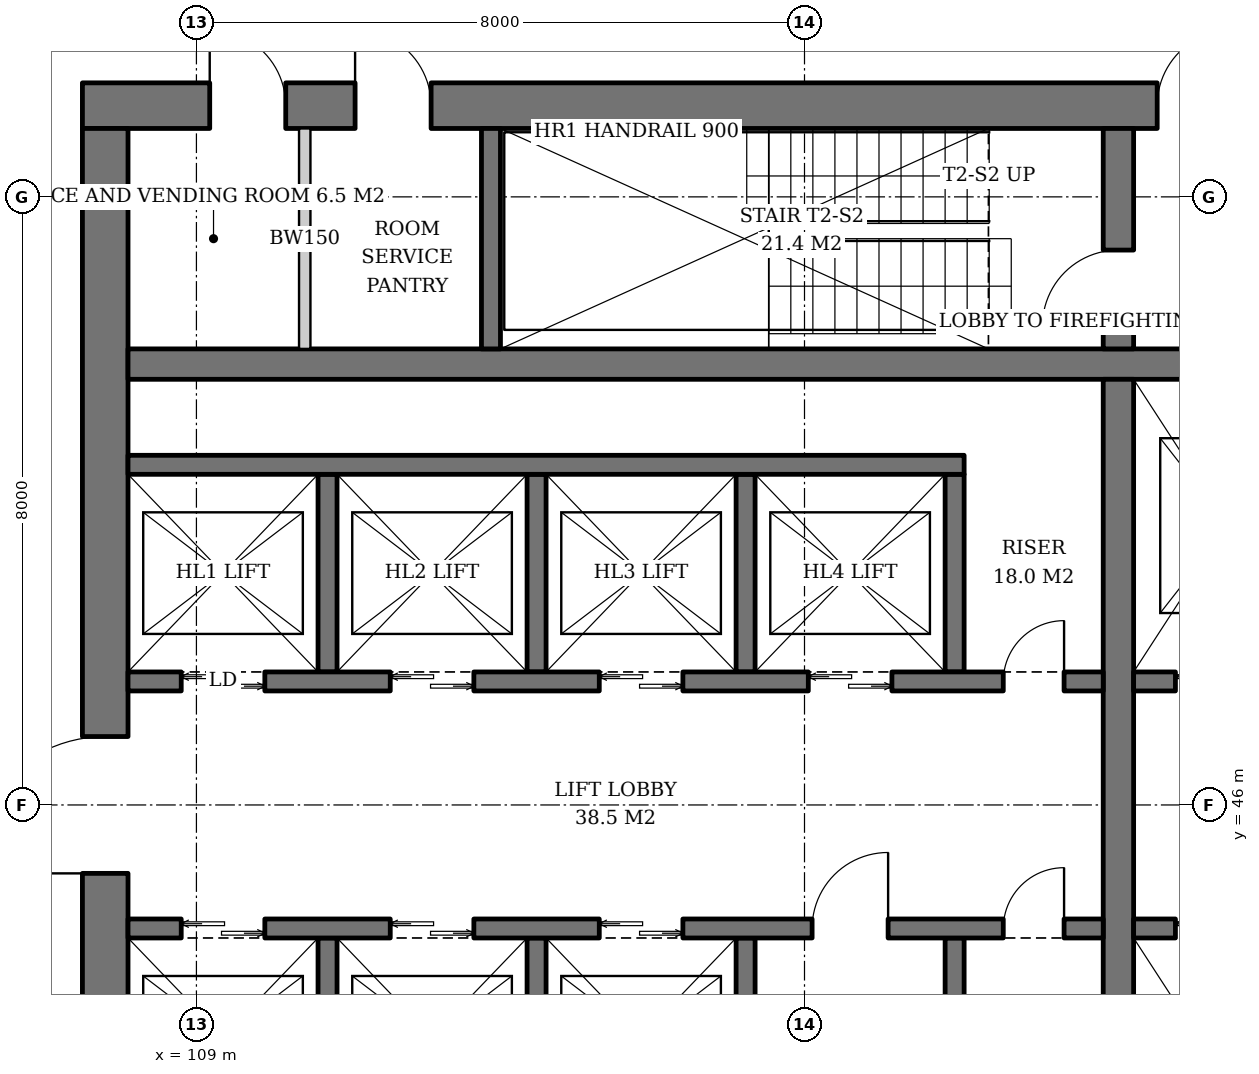
"""IFC4 building model, lengths in metres.
Left out: names, types, materials, properties, quantities, classifications, styles, units other than length and angle.
Written with IfcOpenShell. Run it as: python <this file> out.ifc"""

import sys

from ifc_helpers import new_model, si_unit, direction, frame, frame_2d, origin, place, context, subcontext, project, spatial, rectangle, extrude, element, fill, save


model = new_model("IFC4")
c1 = context("Model", 3, precision=1e-05, world=origin(), true_north=direction((0.0, 1.0)))
c2 = subcontext(c1, "Body", "Model", "MODEL_VIEW")
j1 = project(units=[si_unit("LENGTHUNIT", "METRE"), si_unit("PLANEANGLEUNIT", "RADIAN")], contexts=[c1])
p1 = place(None, origin())
s1 = spatial("IfcSite", under=j1, at=p1, CompositionType="ELEMENT")
p2 = place(p1, origin())
s2 = spatial("IfcBuilding", under=s1, at=p2, CompositionType="ELEMENT")
p3 = place(p2, frame((0.0, 0.0, 55.2)))
s3 = spatial("IfcBuildingStorey", under=s2, at=p3, CompositionType="ELEMENT", Elevation=55.2)
p4 = place(p3, frame((107.5, 55.2, 0.0), z_axis=(0.0, 0.0, 1.0), x_axis=(1.0, 0.0, 0.0)))
e1 = element("IfcWall", 1, at=p4, inside=s3, PredefinedType="SHEAR", context=c2, shape_type="SweptSolid", body=[
    extrude(rectangle(XDim=19.0, YDim=0.6, at=frame_2d((9.5, 0.0))), origin(), (0.0, 0.0, 1.0), 3.8),
])
p5 = place(p4, frame((14.14, 0.0, 0.0)))
e2 = element("IfcOpeningElement", 2, at=p5, cuts=e1, PredefinedType="OPENING", context=c2, shape_type="SweptSolid", body=[
    extrude(rectangle(XDim=1.0, YDim=2.1, at=frame_2d((0.5, 1.05))), frame((0.0, 0.31, 0.0), z_axis=(0.0, -1.0, 0.0), x_axis=(1.0, 0.0, 0.0)), (0.0, 0.0, 1.0), 0.62),
])
p6 = place(p4, frame((1.675, 0.0, 0.0)))
e3 = element("IfcOpeningElement", 3, at=p6, cuts=e1, PredefinedType="OPENING", context=c2, shape_type="SweptSolid", body=[
    extrude(rectangle(XDim=1.0, YDim=2.1, at=frame_2d((0.5, 1.05))), frame((0.0, 0.31, 0.0), z_axis=(0.0, -1.0, 0.0), x_axis=(1.0, 0.0, 0.0)), (0.0, 0.0, 1.0), 0.62),
])
p7 = place(p4, frame((3.587, 0.0, 0.0)))
e4 = element("IfcOpeningElement", 4, at=p7, cuts=e1, PredefinedType="OPENING", context=c2, shape_type="SweptSolid", body=[
    extrude(rectangle(XDim=1.0, YDim=2.1, at=frame_2d((0.5, 1.05))), frame((0.0, 0.31, 0.0), z_axis=(0.0, -1.0, 0.0), x_axis=(1.0, 0.0, 0.0)), (0.0, 0.0, 1.0), 0.62),
])
p8 = place(p3, frame((107.8, 37.1, 0.0), z_axis=(0.0, 0.0, 1.0), x_axis=(0.0, 1.0, 0.0)))
e5 = element("IfcWall", 5, at=p8, inside=s3, PredefinedType="SHEAR", context=c2, shape_type="SweptSolid", body=[
    extrude(rectangle(XDim=17.8, YDim=0.6, at=frame_2d((8.9, 0.0))), origin(), (0.0, 0.0, 1.0), 3.8),
])
p9 = place(p8, frame((8.0, 0.0, 0.0)))
e6 = element("IfcOpeningElement", 6, at=p9, cuts=e5, PredefinedType="OPENING", context=c2, shape_type="SweptSolid", body=[
    extrude(rectangle(XDim=1.8, YDim=2.4, at=frame_2d((0.9, 1.2))), frame((0.0, 0.31, 0.0), z_axis=(0.0, -1.0, 0.0), x_axis=(1.0, 0.0, 0.0)), (0.0, 0.0, 1.0), 0.62),
])
p10 = place(p3, frame((108.1, 51.8, 0.0), z_axis=(0.0, 0.0, 1.0), x_axis=(1.0, 0.0, 0.0)))
e7 = element("IfcWall", 7, at=p10, inside=s3, PredefinedType="SHEAR", context=c2, shape_type="SweptSolid", body=[
    extrude(rectangle(XDim=17.8, YDim=0.4, at=frame_2d((8.9, 0.0))), origin(), (0.0, 0.0, 1.0), 3.8),
])
p11 = place(p3, frame((121.13, 40.4, 0.0), z_axis=(0.0, 0.0, 1.0), x_axis=(0.0, 1.0, 0.0)))
e8 = element("IfcWall", 8, at=p11, inside=s3, PredefinedType="SHEAR", context=c2, shape_type="SweptSolid", body=[
    extrude(rectangle(XDim=11.2, YDim=0.4, at=frame_2d((5.6, 0.0))), origin(), (0.0, 0.0, 1.0), 3.8),
])
p12 = place(p3, frame((121.13, 52.0, 0.0), z_axis=(0.0, 0.0, 1.0), x_axis=(0.0, 1.0, 0.0)))
e9 = element("IfcWall", 9, at=p12, inside=s3, PredefinedType="SHEAR", context=c2, shape_type="SweptSolid", body=[
    extrude(rectangle(XDim=2.9, YDim=0.4, at=frame_2d((1.45, 0.0))), origin(), (0.0, 0.0, 1.0), 3.8),
])
p13 = place(p12, frame((0.3, 0.0, 0.0)))
e10 = element("IfcOpeningElement", 10, at=p13, cuts=e9, PredefinedType="OPENING", context=c2, shape_type="SweptSolid", body=[
    extrude(rectangle(XDim=1.0, YDim=2.1, at=frame_2d((0.5, 1.05))), frame((0.0, 0.21, 0.0), z_axis=(0.0, -1.0, 0.0), x_axis=(1.0, 0.0, 0.0)), (0.0, 0.0, 1.0), 0.42),
])
p14 = place(p3, frame((112.875, 52.0, 0.0), z_axis=(0.0, 0.0, 1.0), x_axis=(0.0, 1.0, 0.0)))
e11 = element("IfcWall", 11, at=p14, inside=s3, PredefinedType="SHEAR", context=c2, shape_type="SweptSolid", body=[
    extrude(rectangle(XDim=2.9, YDim=0.25, at=frame_2d((1.45, 0.0))), origin(), (0.0, 0.0, 1.0), 3.8),
])
for number, where, z_axis, x_axis in (
    (12, (110.725, 47.75, 0.0), (0.0, 0.0, 1.0), (0.0, 1.0, 0.0)),
    (13, (113.475, 47.75, 0.0), (0.0, 0.0, 1.0), (0.0, 1.0, 0.0)),
    (14, (116.225, 47.75, 0.0), (0.0, 0.0, 1.0), (0.0, 1.0, 0.0)),
    (15, (118.975, 47.75, 0.0), (0.0, 0.0, 1.0), (0.0, 1.0, 0.0)),
):
    element("IfcWall", number, at=place(p3, frame(where, z_axis=z_axis, x_axis=x_axis)), inside=s3, PredefinedType="SHEAR", context=c2, shape_type="SweptSolid", body=[
        extrude(rectangle(XDim=2.6, YDim=0.25, at=frame_2d((1.3, 0.0))), origin(), (0.0, 0.0, 1.0), 3.8),
    ])
p15 = place(p3, frame((108.1, 50.475, 0.0), z_axis=(0.0, 0.0, 1.0), x_axis=(1.0, 0.0, 0.0)))
e16 = element("IfcWall", 16, at=p15, inside=s3, PredefinedType="SHEAR", context=c2, shape_type="SweptSolid", body=[
    extrude(rectangle(XDim=11.0, YDim=0.25, at=frame_2d((5.5, 0.0))), origin(), (0.0, 0.0, 1.0), 3.8),
])
p16 = place(p3, frame((108.1, 47.625, 0.0), z_axis=(0.0, 0.0, 1.0), x_axis=(1.0, 0.0, 0.0)))
e17 = element("IfcWall", 17, at=p16, inside=s3, PredefinedType="SHEAR", context=c2, shape_type="SweptSolid", body=[
    extrude(rectangle(XDim=12.83, YDim=0.25, at=frame_2d((6.415, 0.0))), origin(), (0.0, 0.0, 1.0), 3.8),
])
p17 = place(p16, frame((0.7, 0.0, 0.0)))
e18 = element("IfcOpeningElement", 18, at=p17, cuts=e17, PredefinedType="OPENING", context=c2, shape_type="SweptSolid", body=[
    extrude(rectangle(XDim=1.1, YDim=2.2, at=frame_2d((0.55, 1.1))), frame((0.0, 0.135, 0.0), z_axis=(0.0, -1.0, 0.0), x_axis=(1.0, 0.0, 0.0)), (0.0, 0.0, 1.0), 0.27),
])
p18 = place(p16, frame((3.45, 0.0, 0.0)))
e19 = element("IfcOpeningElement", 19, at=p18, cuts=e17, PredefinedType="OPENING", context=c2, shape_type="SweptSolid", body=[
    extrude(rectangle(XDim=1.1, YDim=2.2, at=frame_2d((0.55, 1.1))), frame((0.0, 0.135, 0.0), z_axis=(0.0, -1.0, 0.0), x_axis=(1.0, 0.0, 0.0)), (0.0, 0.0, 1.0), 0.27),
])
p19 = place(p16, frame((6.2, 0.0, 0.0)))
e20 = element("IfcOpeningElement", 20, at=p19, cuts=e17, PredefinedType="OPENING", context=c2, shape_type="SweptSolid", body=[
    extrude(rectangle(XDim=1.1, YDim=2.2, at=frame_2d((0.55, 1.1))), frame((0.0, 0.135, 0.0), z_axis=(0.0, -1.0, 0.0), x_axis=(1.0, 0.0, 0.0)), (0.0, 0.0, 1.0), 0.27),
])
p20 = place(p16, frame((8.95, 0.0, 0.0)))
e21 = element("IfcOpeningElement", 21, at=p20, cuts=e17, PredefinedType="OPENING", context=c2, shape_type="SweptSolid", body=[
    extrude(rectangle(XDim=1.1, YDim=2.2, at=frame_2d((0.55, 1.1))), frame((0.0, 0.135, 0.0), z_axis=(0.0, -1.0, 0.0), x_axis=(1.0, 0.0, 0.0)), (0.0, 0.0, 1.0), 0.27),
])
p21 = place(p16, frame((11.515, 0.0, 0.0)))
e22 = element("IfcOpeningElement", 22, at=p21, cuts=e17, PredefinedType="OPENING", context=c2, shape_type="SweptSolid", body=[
    extrude(rectangle(XDim=0.8, YDim=2.0, at=frame_2d((0.4, 1.0))), frame((0.0, 0.135, 0.0), z_axis=(0.0, -1.0, 0.0), x_axis=(1.0, 0.0, 0.0)), (0.0, 0.0, 1.0), 0.27),
])
for number, where, z_axis, x_axis in (
    (23, (110.725, 44.25, 0.0), (0.0, 0.0, 1.0), (0.0, -1.0, 0.0)),
    (24, (113.475, 44.25, 0.0), (0.0, 0.0, 1.0), (0.0, -1.0, 0.0)),
    (25, (116.225, 44.25, 0.0), (0.0, 0.0, 1.0), (0.0, -1.0, 0.0)),
    (26, (118.975, 44.25, 0.0), (0.0, 0.0, 1.0), (0.0, -1.0, 0.0)),
):
    element("IfcWall", number, at=place(p3, frame(where, z_axis=z_axis, x_axis=x_axis)), inside=s3, PredefinedType="SHEAR", context=c2, shape_type="SweptSolid", body=[
        extrude(rectangle(XDim=2.6, YDim=0.25, at=frame_2d((1.3, 0.0))), origin(), (0.0, 0.0, 1.0), 3.8),
    ])
p22 = place(p3, frame((108.1, 44.375, 0.0), z_axis=(0.0, 0.0, 1.0), x_axis=(1.0, 0.0, 0.0)))
e27 = element("IfcWall", 27, at=p22, inside=s3, PredefinedType="SHEAR", context=c2, shape_type="SweptSolid", body=[
    extrude(rectangle(XDim=12.83, YDim=0.25, at=frame_2d((6.415, 0.0))), origin(), (0.0, 0.0, 1.0), 3.8),
])
p23 = place(p22, frame((0.7, 0.0, 0.0)))
e28 = element("IfcOpeningElement", 28, at=p23, cuts=e27, PredefinedType="OPENING", context=c2, shape_type="SweptSolid", body=[
    extrude(rectangle(XDim=1.1, YDim=2.2, at=frame_2d((0.55, 1.1))), frame((0.0, 0.135, 0.0), z_axis=(0.0, -1.0, 0.0), x_axis=(1.0, 0.0, 0.0)), (0.0, 0.0, 1.0), 0.27),
])
p24 = place(p22, frame((3.45, 0.0, 0.0)))
e29 = element("IfcOpeningElement", 29, at=p24, cuts=e27, PredefinedType="OPENING", context=c2, shape_type="SweptSolid", body=[
    extrude(rectangle(XDim=1.1, YDim=2.2, at=frame_2d((0.55, 1.1))), frame((0.0, 0.135, 0.0), z_axis=(0.0, -1.0, 0.0), x_axis=(1.0, 0.0, 0.0)), (0.0, 0.0, 1.0), 0.27),
])
p25 = place(p22, frame((6.2, 0.0, 0.0)))
e30 = element("IfcOpeningElement", 30, at=p25, cuts=e27, PredefinedType="OPENING", context=c2, shape_type="SweptSolid", body=[
    extrude(rectangle(XDim=1.1, YDim=2.2, at=frame_2d((0.55, 1.1))), frame((0.0, 0.135, 0.0), z_axis=(0.0, -1.0, 0.0), x_axis=(1.0, 0.0, 0.0)), (0.0, 0.0, 1.0), 0.27),
])
p26 = place(p22, frame((9.0, 0.0, 0.0)))
e31 = element("IfcOpeningElement", 31, at=p26, cuts=e27, PredefinedType="OPENING", context=c2, shape_type="SweptSolid", body=[
    extrude(rectangle(XDim=1.0, YDim=2.1, at=frame_2d((0.5, 1.05))), frame((0.0, 0.135, 0.0), z_axis=(0.0, -1.0, 0.0), x_axis=(1.0, 0.0, 0.0)), (0.0, 0.0, 1.0), 0.27),
])
p27 = place(p22, frame((11.515, 0.0, 0.0)))
e32 = element("IfcOpeningElement", 32, at=p27, cuts=e27, PredefinedType="OPENING", context=c2, shape_type="SweptSolid", body=[
    extrude(rectangle(XDim=0.8, YDim=2.0, at=frame_2d((0.4, 1.0))), frame((0.0, 0.135, 0.0), z_axis=(0.0, -1.0, 0.0), x_axis=(1.0, 0.0, 0.0)), (0.0, 0.0, 1.0), 0.27),
])
p28 = place(p3, frame((121.33, 47.625, 0.0), z_axis=(0.0, 0.0, 1.0), x_axis=(1.0, 0.0, 0.0)))
e33 = element("IfcWall", 33, at=p28, inside=s3, PredefinedType="SHEAR", context=c2, shape_type="SweptSolid", body=[
    extrude(rectangle(XDim=4.57, YDim=0.25, at=frame_2d((2.285, 0.0))), origin(), (0.0, 0.0, 1.0), 3.8),
])
p29 = place(p28, frame((0.55, 0.0, 0.0)))
e34 = element("IfcOpeningElement", 34, at=p29, cuts=e33, PredefinedType="OPENING", context=c2, shape_type="SweptSolid", body=[
    extrude(rectangle(XDim=1.4, YDim=2.4, at=frame_2d((0.7, 1.2))), frame((0.0, 0.135, 0.0), z_axis=(0.0, -1.0, 0.0), x_axis=(1.0, 0.0, 0.0)), (0.0, 0.0, 1.0), 0.27),
])
p30 = place(p28, frame((3.26, 0.0, 0.0)))
e35 = element("IfcOpeningElement", 35, at=p30, cuts=e33, PredefinedType="OPENING", context=c2, shape_type="SweptSolid", body=[
    extrude(rectangle(XDim=0.8, YDim=2.0, at=frame_2d((0.4, 1.0))), frame((0.0, 0.135, 0.0), z_axis=(0.0, -1.0, 0.0), x_axis=(1.0, 0.0, 0.0)), (0.0, 0.0, 1.0), 0.27),
])
p31 = place(p3, frame((121.33, 44.375, 0.0), z_axis=(0.0, 0.0, 1.0), x_axis=(1.0, 0.0, 0.0)))
e36 = element("IfcWall", 36, at=p31, inside=s3, PredefinedType="SHEAR", context=c2, shape_type="SweptSolid", body=[
    extrude(rectangle(XDim=4.57, YDim=0.25, at=frame_2d((2.285, 0.0))), origin(), (0.0, 0.0, 1.0), 3.8),
])
p32 = place(p31, frame((0.55, 0.0, 0.0)))
e37 = element("IfcOpeningElement", 37, at=p32, cuts=e36, PredefinedType="OPENING", context=c2, shape_type="SweptSolid", body=[
    extrude(rectangle(XDim=1.4, YDim=2.4, at=frame_2d((0.7, 1.2))), frame((0.0, 0.135, 0.0), z_axis=(0.0, -1.0, 0.0), x_axis=(1.0, 0.0, 0.0)), (0.0, 0.0, 1.0), 0.27),
])
p33 = place(p31, frame((3.26, 0.0, 0.0)))
e38 = element("IfcOpeningElement", 38, at=p33, cuts=e36, PredefinedType="OPENING", context=c2, shape_type="SweptSolid", body=[
    extrude(rectangle(XDim=0.8, YDim=2.0, at=frame_2d((0.4, 1.0))), frame((0.0, 0.135, 0.0), z_axis=(0.0, -1.0, 0.0), x_axis=(1.0, 0.0, 0.0)), (0.0, 0.0, 1.0), 0.27),
])
p34 = place(p3, frame((110.425, 52.0, 0.0), z_axis=(0.0, 0.0, 1.0), x_axis=(0.0, 1.0, 0.0)))
e39 = element("IfcWall", 39, at=p34, inside=s3, PredefinedType="SOLIDWALL", context=c2, shape_type="SweptSolid", body=[
    extrude(rectangle(XDim=2.9, YDim=0.15, at=frame_2d((1.45, 0.0))), origin(), (0.0, 0.0, 1.0), 3.6),
])
p35 = place(p17, origin())
e40 = element("IfcDoor", 40, at=p35, inside=s3, OperationType="DOUBLE_DOOR_SLIDING", PredefinedType="DOOR", context=c2, shape_type="SweptSolid", body=[
    extrude(rectangle(XDim=1.1, YDim=2.2, at=frame_2d((0.55, 1.1))), frame((0.0, 0.025, 0.0), z_axis=(0.0, -1.0, 0.0), x_axis=(1.0, 0.0, 0.0)), (0.0, 0.0, 1.0), 0.05),
])
fill(e18, e40)
p36 = place(p18, origin())
e41 = element("IfcDoor", 41, at=p36, inside=s3, OperationType="DOUBLE_DOOR_SLIDING", PredefinedType="DOOR", context=c2, shape_type="SweptSolid", body=[
    extrude(rectangle(XDim=1.1, YDim=2.2, at=frame_2d((0.55, 1.1))), frame((0.0, 0.025, 0.0), z_axis=(0.0, -1.0, 0.0), x_axis=(1.0, 0.0, 0.0)), (0.0, 0.0, 1.0), 0.05),
])
fill(e19, e41)
p37 = place(p19, origin())
e42 = element("IfcDoor", 42, at=p37, inside=s3, OperationType="DOUBLE_DOOR_SLIDING", PredefinedType="DOOR", context=c2, shape_type="SweptSolid", body=[
    extrude(rectangle(XDim=1.1, YDim=2.2, at=frame_2d((0.55, 1.1))), frame((0.0, 0.025, 0.0), z_axis=(0.0, -1.0, 0.0), x_axis=(1.0, 0.0, 0.0)), (0.0, 0.0, 1.0), 0.05),
])
fill(e20, e42)
p38 = place(p20, origin())
e43 = element("IfcDoor", 43, at=p38, inside=s3, OperationType="DOUBLE_DOOR_SLIDING", PredefinedType="DOOR", context=c2, shape_type="SweptSolid", body=[
    extrude(rectangle(XDim=1.1, YDim=2.2, at=frame_2d((0.55, 1.1))), frame((0.0, 0.025, 0.0), z_axis=(0.0, -1.0, 0.0), x_axis=(1.0, 0.0, 0.0)), (0.0, 0.0, 1.0), 0.05),
])
fill(e21, e43)
p39 = place(p21, origin())
e44 = element("IfcDoor", 44, at=p39, inside=s3, OperationType="SINGLE_SWING_RIGHT", PredefinedType="DOOR", context=c2, shape_type="SweptSolid", body=[
    extrude(rectangle(XDim=0.8, YDim=2.0, at=frame_2d((0.4, 1.0))), frame((0.0, 0.025, 0.0), z_axis=(0.0, -1.0, 0.0), x_axis=(1.0, 0.0, 0.0)), (0.0, 0.0, 1.0), 0.05),
])
fill(e22, e44)
p40 = place(p23, origin())
e45 = element("IfcDoor", 45, at=p40, inside=s3, OperationType="DOUBLE_DOOR_SLIDING", PredefinedType="DOOR", context=c2, shape_type="SweptSolid", body=[
    extrude(rectangle(XDim=1.1, YDim=2.2, at=frame_2d((0.55, 1.1))), frame((0.0, 0.025, 0.0), z_axis=(0.0, -1.0, 0.0), x_axis=(1.0, 0.0, 0.0)), (0.0, 0.0, 1.0), 0.05),
])
fill(e28, e45)
p41 = place(p24, origin())
e46 = element("IfcDoor", 46, at=p41, inside=s3, OperationType="DOUBLE_DOOR_SLIDING", PredefinedType="DOOR", context=c2, shape_type="SweptSolid", body=[
    extrude(rectangle(XDim=1.1, YDim=2.2, at=frame_2d((0.55, 1.1))), frame((0.0, 0.025, 0.0), z_axis=(0.0, -1.0, 0.0), x_axis=(1.0, 0.0, 0.0)), (0.0, 0.0, 1.0), 0.05),
])
fill(e29, e46)
p42 = place(p25, origin())
e47 = element("IfcDoor", 47, at=p42, inside=s3, OperationType="DOUBLE_DOOR_SLIDING", PredefinedType="DOOR", context=c2, shape_type="SweptSolid", body=[
    extrude(rectangle(XDim=1.1, YDim=2.2, at=frame_2d((0.55, 1.1))), frame((0.0, 0.025, 0.0), z_axis=(0.0, -1.0, 0.0), x_axis=(1.0, 0.0, 0.0)), (0.0, 0.0, 1.0), 0.05),
])
fill(e30, e47)
p43 = place(p26, origin())
e48 = element("IfcDoor", 48, at=p43, inside=s3, OperationType="SINGLE_SWING_RIGHT", PredefinedType="DOOR", context=c2, shape_type="SweptSolid", body=[
    extrude(rectangle(XDim=1.0, YDim=2.1, at=frame_2d((0.5, 1.05))), frame((0.0, 0.025, 0.0), z_axis=(0.0, -1.0, 0.0), x_axis=(1.0, 0.0, 0.0)), (0.0, 0.0, 1.0), 0.05),
])
fill(e31, e48)
p44 = place(p27, origin())
e49 = element("IfcDoor", 49, at=p44, inside=s3, OperationType="SINGLE_SWING_RIGHT", PredefinedType="DOOR", context=c2, shape_type="SweptSolid", body=[
    extrude(rectangle(XDim=0.8, YDim=2.0, at=frame_2d((0.4, 1.0))), frame((0.0, 0.025, 0.0), z_axis=(0.0, -1.0, 0.0), x_axis=(1.0, 0.0, 0.0)), (0.0, 0.0, 1.0), 0.05),
])
fill(e32, e49)
p45 = place(p29, origin())
e50 = element("IfcDoor", 50, at=p45, inside=s3, OperationType="DOUBLE_DOOR_SLIDING", PredefinedType="DOOR", context=c2, shape_type="SweptSolid", body=[
    extrude(rectangle(XDim=1.4, YDim=2.4, at=frame_2d((0.7, 1.2))), frame((0.0, 0.025, 0.0), z_axis=(0.0, -1.0, 0.0), x_axis=(1.0, 0.0, 0.0)), (0.0, 0.0, 1.0), 0.05),
])
fill(e34, e50)
p46 = place(p32, origin())
e51 = element("IfcDoor", 51, at=p46, inside=s3, OperationType="DOUBLE_DOOR_SLIDING", PredefinedType="DOOR", context=c2, shape_type="SweptSolid", body=[
    extrude(rectangle(XDim=1.4, YDim=2.4, at=frame_2d((0.7, 1.2))), frame((0.0, 0.025, 0.0), z_axis=(0.0, -1.0, 0.0), x_axis=(1.0, 0.0, 0.0)), (0.0, 0.0, 1.0), 0.05),
])
fill(e37, e51)
p47 = place(p13, origin())
e52 = element("IfcDoor", 52, at=p47, inside=s3, OperationType="SINGLE_SWING_LEFT", PredefinedType="DOOR", context=c2, shape_type="SweptSolid", body=[
    extrude(rectangle(XDim=1.0, YDim=2.1, at=frame_2d((0.5, 1.05))), frame((0.0, 0.025, 0.0), z_axis=(0.0, -1.0, 0.0), x_axis=(1.0, 0.0, 0.0)), (0.0, 0.0, 1.0), 0.05),
])
fill(e10, e52)
p48 = place(p5, origin())
e53 = element("IfcDoor", 53, at=p48, inside=s3, OperationType="SINGLE_SWING_RIGHT", PredefinedType="DOOR", context=c2, shape_type="SweptSolid", body=[
    extrude(rectangle(XDim=1.0, YDim=2.1, at=frame_2d((0.5, 1.05))), frame((0.0, 0.025, 0.0), z_axis=(0.0, -1.0, 0.0), x_axis=(1.0, 0.0, 0.0)), (0.0, 0.0, 1.0), 0.05),
])
fill(e2, e53)
p49 = place(p9, origin())
e54 = element("IfcDoor", 54, at=p49, inside=s3, OperationType="DOUBLE_DOOR_SINGLE_SWING", PredefinedType="DOOR", context=c2, shape_type="SweptSolid", body=[
    extrude(rectangle(XDim=1.8, YDim=2.4, at=frame_2d((0.9, 1.2))), frame((0.0, 0.025, 0.0), z_axis=(0.0, -1.0, 0.0), x_axis=(1.0, 0.0, 0.0)), (0.0, 0.0, 1.0), 0.05),
])
fill(e6, e54)
p50 = place(p6, origin())
e55 = element("IfcDoor", 55, at=p50, inside=s3, OperationType="SINGLE_SWING_LEFT", PredefinedType="DOOR", context=c2, shape_type="SweptSolid", body=[
    extrude(rectangle(XDim=1.0, YDim=2.1, at=frame_2d((0.5, 1.05))), frame((0.0, -0.24, 0.0), z_axis=(0.0, -1.0, 0.0), x_axis=(1.0, 0.0, 0.0)), (0.0, 0.0, 1.0), 0.05),
])
fill(e3, e55)
p51 = place(p7, origin())
e56 = element("IfcDoor", 56, at=p51, inside=s3, OperationType="SINGLE_SWING_LEFT", PredefinedType="DOOR", context=c2, shape_type="SweptSolid", body=[
    extrude(rectangle(XDim=1.0, YDim=2.1, at=frame_2d((0.5, 1.05))), frame((0.0, -0.24, 0.0), z_axis=(0.0, -1.0, 0.0), x_axis=(1.0, 0.0, 0.0)), (0.0, 0.0, 1.0), 0.05),
])
fill(e4, e56)
save(model, sys.argv[1])
